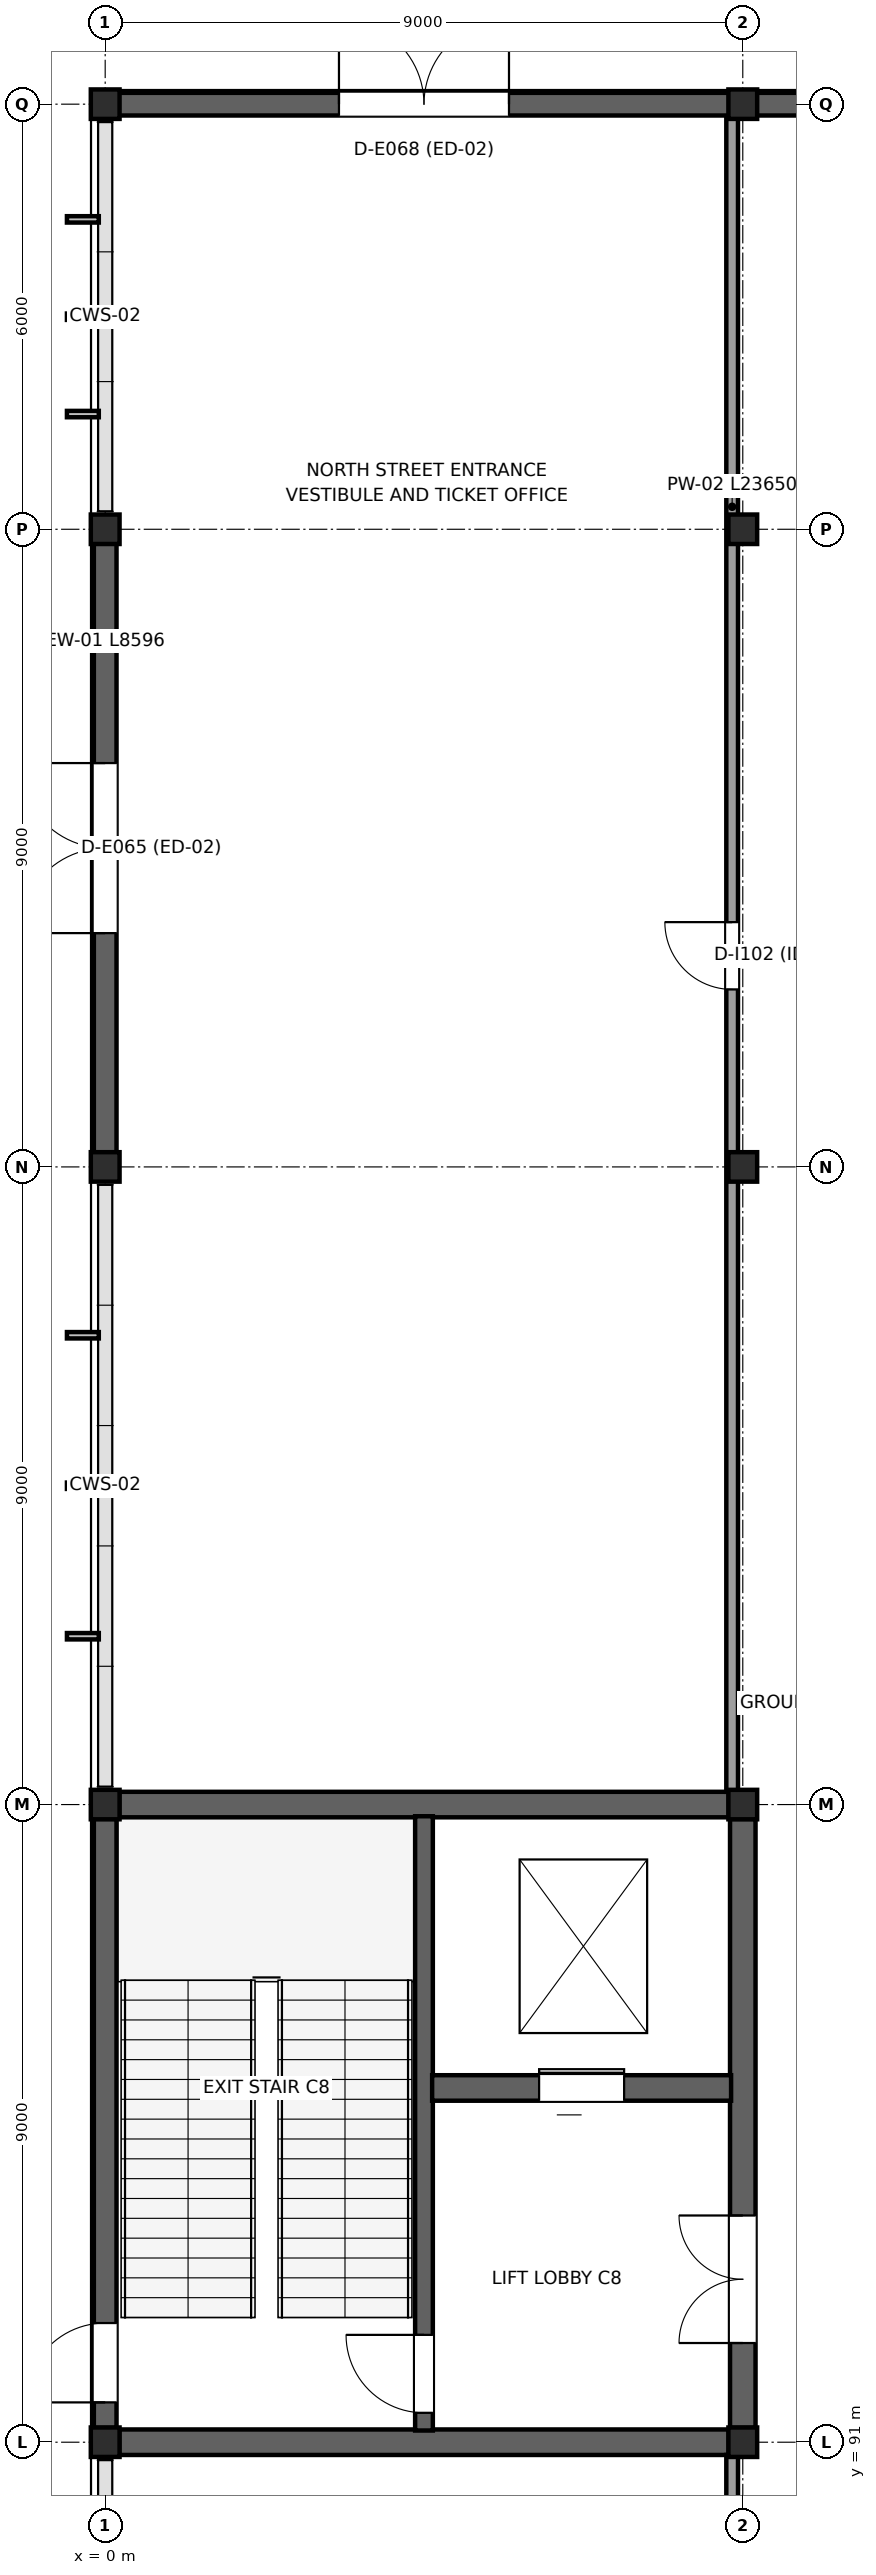
"""IFC4 building model, lengths in metres.
Left out: names, types, materials, properties, quantities, classifications, styles, units other than length and angle.
Written with IfcOpenShell. Run it as: python <this file> out.ifc"""

import sys

from ifc_helpers import new_model, si_unit, direction, frame, frame_2d, origin, origin_2d, place, context, subcontext, project, spatial, rectangle, i_section, extrude, element, fill, save


model = new_model("IFC4")
c1 = context("Model", 3, precision=1e-05, world=origin(), true_north=direction((0.0, 1.0)))
c2 = subcontext(c1, "Body", "Model", "MODEL_VIEW")
j1 = project(units=[si_unit("LENGTHUNIT", "METRE"), si_unit("PLANEANGLEUNIT", "RADIAN")], contexts=[c1])
p1 = place(None, origin())
s1 = spatial("IfcSite", under=j1, at=p1, CompositionType="ELEMENT")
p2 = place(p1, origin())
s2 = spatial("IfcBuilding", under=s1, at=p2, CompositionType="ELEMENT")
p3 = place(p2, origin())
s3 = spatial("IfcBuildingStorey", under=s2, at=p3, CompositionType="ELEMENT", Elevation=0.0)
for number, where, z_axis, x_axis in (
    (1, (0.0, 91.0, 0.0), (0.0, 0.0, 1.0), (1.0, 0.0, 0.0)),
    (2, (0.0, 100.0, 0.0), (0.0, 0.0, 1.0), (1.0, 0.0, 0.0)),
    (3, (0.0, 109.0, 0.0), (0.0, 0.0, 1.0), (1.0, 0.0, 0.0)),
    (4, (0.0, 118.0, 0.0), (0.0, 0.0, 1.0), (1.0, 0.0, 0.0)),
    (5, (0.0, 124.0, 0.0), (0.0, 0.0, 1.0), (1.0, 0.0, 0.0)),
    (6, (9.0, 91.0, 0.0), (0.0, 0.0, 1.0), (1.0, 0.0, 0.0)),
    (7, (9.0, 100.0, 0.0), (0.0, 0.0, 1.0), (1.0, 0.0, 0.0)),
    (8, (9.0, 109.0, 0.0), (0.0, 0.0, 1.0), (1.0, 0.0, 0.0)),
    (9, (9.0, 118.0, 0.0), (0.0, 0.0, 1.0), (1.0, 0.0, 0.0)),
    (10, (9.0, 124.0, 0.0), (0.0, 0.0, 1.0), (1.0, 0.0, 0.0)),
):
    element("IfcColumn", number, at=place(p3, frame(where, z_axis=z_axis, x_axis=x_axis)), inside=s3, PredefinedType="COLUMN", context=c2, shape_type="SweptSolid", body=[
        extrude(i_section(OverallWidth=0.406, OverallDepth=0.416, WebThickness=0.03, FlangeThickness=0.048, at=origin_2d()), origin(), (0.0, 0.0, 1.0), 6.0),
    ])
p4 = place(p3, frame((0.0, 91.202, 0.0), z_axis=(0.0, 0.0, 1.0), x_axis=(0.0, 1.0, 0.0)))
e11 = element("IfcWall", 11, at=p4, inside=s3, PredefinedType="STANDARD", context=c2, shape_type="SweptSolid", body=[
    extrude(rectangle(XDim=8.596, YDim=0.32, at=frame_2d((4.298, 0.0))), origin(), (0.0, 0.0, 1.0), 5.78),
])
p5 = place(p4, frame((0.36, 0.0, 0.0)))
e12 = element("IfcOpeningElement", 12, at=p5, cuts=e11, PredefinedType="OPENING", context=c2, shape_type="SweptSolid", body=[
    extrude(rectangle(XDim=1.12, YDim=2.24, at=frame_2d((0.56, 1.12))), frame((0.0, 0.17, 0.0), z_axis=(0.0, -1.0, 0.0), x_axis=(1.0, 0.0, 0.0)), (0.0, 0.0, 1.0), 0.34),
])
p6 = place(p3, frame((0.0, 109.202, 0.0), z_axis=(0.0, 0.0, 1.0), x_axis=(0.0, 1.0, 0.0)))
e13 = element("IfcWall", 13, at=p6, inside=s3, PredefinedType="STANDARD", context=c2, shape_type="SweptSolid", body=[
    extrude(rectangle(XDim=8.596, YDim=0.32, at=frame_2d((4.298, 0.0))), origin(), (0.0, 0.0, 1.0), 5.78),
])
p7 = place(p6, frame((3.098, 0.0, 0.0)))
e14 = element("IfcOpeningElement", 14, at=p7, cuts=e13, PredefinedType="OPENING", context=c2, shape_type="SweptSolid", body=[
    extrude(rectangle(XDim=2.4, YDim=2.6, at=frame_2d((1.2, 1.3))), frame((0.0, 0.17, 0.0), z_axis=(0.0, -1.0, 0.0), x_axis=(1.0, 0.0, 0.0)), (0.0, 0.0, 1.0), 0.34),
])
p8 = place(p3, frame((0.022, 124.0, 0.0), z_axis=(0.0, 0.0, 1.0), x_axis=(1.0, 0.0, 0.0)))
e15 = element("IfcWall", 15, at=p8, inside=s3, PredefinedType="STANDARD", context=c2, shape_type="SweptSolid", body=[
    extrude(rectangle(XDim=8.956, YDim=0.32, at=frame_2d((4.478, 0.0))), origin(), (0.0, 0.0, 1.0), 5.78),
])
p9 = place(p8, frame((3.278, 0.0, 0.0)))
e16 = element("IfcOpeningElement", 16, at=p9, cuts=e15, PredefinedType="OPENING", context=c2, shape_type="SweptSolid", body=[
    extrude(rectangle(XDim=2.4, YDim=2.6, at=frame_2d((1.2, 1.3))), frame((0.0, 0.17, 0.0), z_axis=(0.0, -1.0, 0.0), x_axis=(1.0, 0.0, 0.0)), (0.0, 0.0, 1.0), 0.34),
])
p10 = place(p3, frame((9.022, 124.0, 0.0), z_axis=(0.0, 0.0, 1.0), x_axis=(1.0, 0.0, 0.0)))
e17 = element("IfcWall", 17, at=p10, inside=s3, PredefinedType="STANDARD", context=c2, shape_type="SweptSolid", body=[
    extrude(rectangle(XDim=8.956, YDim=0.32, at=frame_2d((4.478, 0.0))), origin(), (0.0, 0.0, 1.0), 5.78),
])
p11 = place(p10, frame((3.428, 0.0, 1.0)))
e18 = element("IfcOpeningElement", 18, at=p11, cuts=e17, PredefinedType="OPENING", context=c2, shape_type="SweptSolid", body=[
    extrude(rectangle(XDim=2.1, YDim=2.25, at=frame_2d((1.05, 1.125))), frame((0.0, 0.17, 0.0), z_axis=(0.0, -1.0, 0.0), x_axis=(1.0, 0.0, 0.0)), (0.0, 0.0, 1.0), 0.34),
])
p12 = place(p3, frame((9.0, 91.203, 0.0), z_axis=(0.0, 0.0, 1.0), x_axis=(0.0, 1.0, 0.0)))
e19 = element("IfcWall", 19, at=p12, inside=s3, PredefinedType="SHEAR", context=c2, shape_type="SweptSolid", body=[
    extrude(rectangle(XDim=8.594, YDim=0.36, at=frame_2d((4.297, 0.0))), origin(), (0.0, 0.0, 1.0), 5.78),
])
p13 = place(p12, frame((1.197, 0.0, 0.0)))
e20 = element("IfcOpeningElement", 20, at=p13, cuts=e19, PredefinedType="OPENING", context=c2, shape_type="SweptSolid", body=[
    extrude(rectangle(XDim=1.8, YDim=2.3, at=frame_2d((0.9, 1.15))), frame((0.0, 0.19, 0.0), z_axis=(0.0, -1.0, 0.0), x_axis=(1.0, 0.0, 0.0)), (0.0, 0.0, 1.0), 0.38),
])
for number, where, z_axis, x_axis in (
    (21, (0.198, 91.0, 0.0), (0.0, 0.0, 1.0), (1.0, 0.0, 0.0)),
    (22, (0.198, 100.0, 0.0), (0.0, 0.0, 1.0), (1.0, 0.0, 0.0)),
):
    element("IfcWall", number, at=place(p3, frame(where, z_axis=z_axis, x_axis=x_axis)), inside=s3, PredefinedType="SHEAR", context=c2, shape_type="SweptSolid", body=[
        extrude(rectangle(XDim=8.604, YDim=0.36, at=frame_2d((4.302, 0.0))), origin(), (0.0, 0.0, 1.0), 5.78),
    ])
p14 = place(p3, frame((4.5, 91.165, 0.0), z_axis=(0.0, 0.0, 1.0), x_axis=(0.0, 1.0, 0.0)))
e23 = element("IfcWall", 23, at=p14, inside=s3, PredefinedType="SHEAR", context=c2, shape_type="SweptSolid", body=[
    extrude(rectangle(XDim=8.67, YDim=0.25, at=frame_2d((4.335, 0.0))), origin(), (0.0, 0.0, 1.0), 5.78),
])
p15 = place(p14, frame((0.25, 0.0, 0.0)))
e24 = element("IfcOpeningElement", 24, at=p15, cuts=e23, PredefinedType="OPENING", context=c2, shape_type="SweptSolid", body=[
    extrude(rectangle(XDim=1.1, YDim=2.2, at=frame_2d((0.55, 1.1))), frame((0.0, 0.135, 0.0), z_axis=(0.0, -1.0, 0.0), x_axis=(1.0, 0.0, 0.0)), (0.0, 0.0, 1.0), 0.27),
])
p16 = place(p3, frame((4.615, 96.0, 0.0), z_axis=(0.0, 0.0, 1.0), x_axis=(1.0, 0.0, 0.0)))
e25 = element("IfcWall", 25, at=p16, inside=s3, PredefinedType="SHEAR", context=c2, shape_type="SweptSolid", body=[
    extrude(rectangle(XDim=4.22, YDim=0.36, at=frame_2d((2.11, 0.0))), origin(), (0.0, 0.0, 1.0), 5.78),
])
p17 = place(p16, frame((1.51, 0.0, 0.0)))
e26 = element("IfcOpeningElement", 26, at=p17, cuts=e25, PredefinedType="OPENING", context=c2, shape_type="SweptSolid", body=[
    extrude(rectangle(XDim=1.2, YDim=2.3, at=frame_2d((0.6, 1.15))), frame((0.0, 0.19, 0.0), z_axis=(0.0, -1.0, 0.0), x_axis=(1.0, 0.0, 0.0)), (0.0, 0.0, 1.0), 0.38),
])
p18 = place(p3, frame((8.85, 63.78, 0.0), z_axis=(0.0, 0.0, 1.0), x_axis=(0.0, 1.0, 0.0)))
e27 = element("IfcWall", 27, at=p18, inside=s3, PredefinedType="PARTITIONING", context=c2, shape_type="SweptSolid", body=[
    extrude(rectangle(XDim=27.04, YDim=0.165, at=frame_2d((13.52, 0.0))), origin(), (0.0, 0.0, 1.0), 4.65),
])
p19 = place(p18, frame((2.72, 0.0, 0.0)))
e28 = element("IfcOpeningElement", 28, at=p19, cuts=e27, PredefinedType="OPENING", context=c2, shape_type="SweptSolid", body=[
    extrude(rectangle(XDim=0.98, YDim=2.15, at=frame_2d((0.49, 1.075))), frame((0.0, 0.093, 0.0), z_axis=(0.0, -1.0, 0.0), x_axis=(1.0, 0.0, 0.0)), (0.0, 0.0, 1.0), 0.185),
])
p20 = place(p18, frame((9.72, 0.0, 0.0)))
e29 = element("IfcOpeningElement", 29, at=p20, cuts=e27, PredefinedType="OPENING", context=c2, shape_type="SweptSolid", body=[
    extrude(rectangle(XDim=1.02, YDim=2.16, at=frame_2d((0.51, 1.08))), frame((0.0, 0.093, 0.0), z_axis=(0.0, -1.0, 0.0), x_axis=(1.0, 0.0, 0.0)), (0.0, 0.0, 1.0), 0.185),
])
p21 = place(p18, frame((14.72, 0.0, 0.0)))
e30 = element("IfcOpeningElement", 30, at=p21, cuts=e27, PredefinedType="OPENING", context=c2, shape_type="SweptSolid", body=[
    extrude(rectangle(XDim=0.95, YDim=2.12, at=frame_2d((0.475, 1.06))), frame((0.0, 0.093, 0.0), z_axis=(0.0, -1.0, 0.0), x_axis=(1.0, 0.0, 0.0)), (0.0, 0.0, 1.0), 0.185),
])
p22 = place(p3, frame((8.85, 100.18, 0.0), z_axis=(0.0, 0.0, 1.0), x_axis=(0.0, 1.0, 0.0)))
e31 = element("IfcWall", 31, at=p22, inside=s3, PredefinedType="PARTITIONING", context=c2, shape_type="SweptSolid", body=[
    extrude(rectangle(XDim=23.65, YDim=0.165, at=frame_2d((11.825, 0.0))), origin(), (0.0, 0.0, 1.0), 4.65),
])
p23 = place(p22, frame((11.325, 0.0, 0.0)))
e32 = element("IfcOpeningElement", 32, at=p23, cuts=e31, PredefinedType="OPENING", context=c2, shape_type="SweptSolid", body=[
    extrude(rectangle(XDim=0.95, YDim=2.12, at=frame_2d((0.475, 1.06))), frame((0.0, 0.093, 0.0), z_axis=(0.0, -1.0, 0.0), x_axis=(1.0, 0.0, 0.0)), (0.0, 0.0, 1.0), 0.185),
])
p24 = place(p5, origin())
e33 = element("IfcDoor", 33, at=p24, inside=s3, OperationType="SINGLE_SWING_LEFT", PredefinedType="DOOR", context=c2, shape_type="SweptSolid", body=[
    extrude(rectangle(XDim=1.12, YDim=2.24, at=frame_2d((0.56, 1.12))), frame((0.0, 0.025, 0.0), z_axis=(0.0, -1.0, 0.0), x_axis=(1.0, 0.0, 0.0)), (0.0, 0.0, 1.0), 0.05),
])
fill(e12, e33)
p25 = place(p7, origin())
e34 = element("IfcDoor", 34, at=p25, inside=s3, OperationType="DOUBLE_DOOR_SINGLE_SWING", PredefinedType="DOOR", context=c2, shape_type="SweptSolid", body=[
    extrude(rectangle(XDim=2.4, YDim=2.6, at=frame_2d((1.2, 1.3))), frame((0.0, 0.025, 0.0), z_axis=(0.0, -1.0, 0.0), x_axis=(1.0, 0.0, 0.0)), (0.0, 0.0, 1.0), 0.05),
])
fill(e14, e34)
p26 = place(p9, origin())
e35 = element("IfcDoor", 35, at=p26, inside=s3, OperationType="DOUBLE_DOOR_SINGLE_SWING", PredefinedType="DOOR", context=c2, shape_type="SweptSolid", body=[
    extrude(rectangle(XDim=2.4, YDim=2.6, at=frame_2d((1.2, 1.3))), frame((0.0, 0.025, 0.0), z_axis=(0.0, -1.0, 0.0), x_axis=(1.0, 0.0, 0.0)), (0.0, 0.0, 1.0), 0.05),
])
fill(e16, e35)
p27 = place(p15, origin())
e36 = element("IfcDoor", 36, at=p27, inside=s3, OperationType="SINGLE_SWING_RIGHT", PredefinedType="DOOR", context=c2, shape_type="SweptSolid", body=[
    extrude(rectangle(XDim=1.1, YDim=2.2, at=frame_2d((0.55, 1.1))), frame((0.0, 0.025, 0.0), z_axis=(0.0, -1.0, 0.0), x_axis=(1.0, 0.0, 0.0)), (0.0, 0.0, 1.0), 0.05),
])
fill(e24, e36)
p28 = place(p17, origin())
e37 = element("IfcDoor", 37, at=p28, inside=s3, OperationType="SLIDING_TO_LEFT", PredefinedType="DOOR", context=c2, shape_type="SweptSolid", body=[
    extrude(rectangle(XDim=1.2, YDim=2.3, at=frame_2d((0.6, 1.15))), frame((0.0, 0.025, 0.0), z_axis=(0.0, -1.0, 0.0), x_axis=(1.0, 0.0, 0.0)), (0.0, 0.0, 1.0), 0.05),
])
fill(e26, e37)
p29 = place(p13, origin())
e38 = element("IfcDoor", 38, at=p29, inside=s3, OperationType="DOUBLE_DOOR_SINGLE_SWING", PredefinedType="DOOR", context=c2, shape_type="SweptSolid", body=[
    extrude(rectangle(XDim=1.8, YDim=2.3, at=frame_2d((0.9, 1.15))), frame((0.0, 0.025, 0.0), z_axis=(0.0, -1.0, 0.0), x_axis=(1.0, 0.0, 0.0)), (0.0, 0.0, 1.0), 0.05),
])
fill(e20, e38)
p30 = place(p23, origin())
e39 = element("IfcDoor", 39, at=p30, inside=s3, OperationType="SINGLE_SWING_RIGHT", PredefinedType="DOOR", context=c2, shape_type="SweptSolid", body=[
    extrude(rectangle(XDim=0.95, YDim=2.12, at=frame_2d((0.475, 1.06))), frame((0.0, 0.025, 0.0), z_axis=(0.0, -1.0, 0.0), x_axis=(1.0, 0.0, 0.0)), (0.0, 0.0, 1.0), 0.05),
])
fill(e32, e39)
save(model, sys.argv[1])
